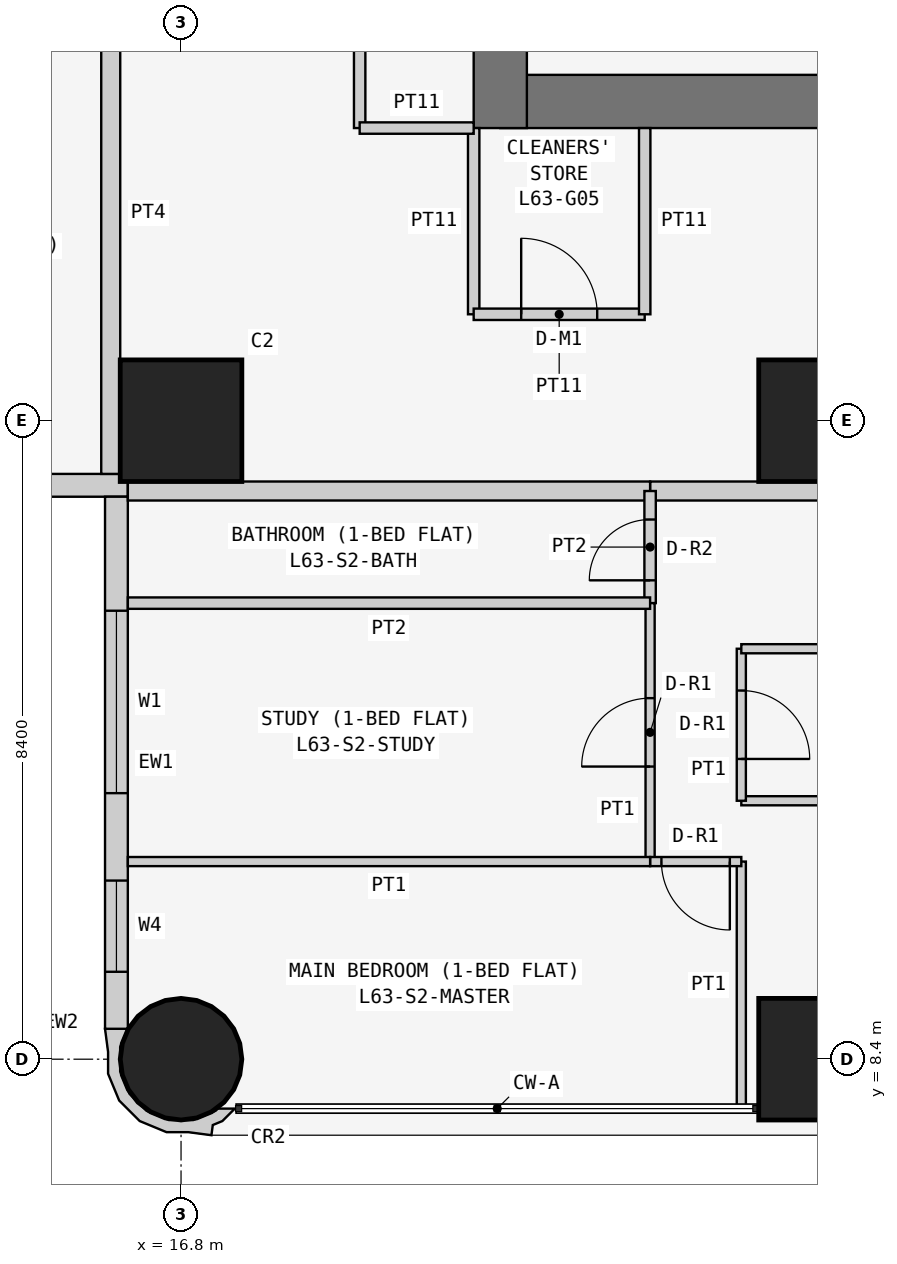
"""IFC4 building model, lengths in metres.
Left out: names, types, materials, properties, quantities, classifications, styles, units other than length and angle.
Written with IfcOpenShell. Run it as: python <this file> out.ifc"""

import sys

from ifc_helpers import new_model, si_unit, direction, frame, frame_2d, origin, origin_2d, place, context, subcontext, project, spatial, polyline, rectangle, circle, outline, extrude, element, fill, save


model = new_model("IFC4")
c1 = context("Model", 3, precision=1e-05, world=origin(), true_north=direction((0.0, 1.0)))
c2 = subcontext(c1, "Body", "Model", "MODEL_VIEW")
j1 = project(units=[si_unit("LENGTHUNIT", "METRE"), si_unit("PLANEANGLEUNIT", "RADIAN")], contexts=[c1])
p1 = place(None, origin())
s1 = spatial("IfcSite", under=j1, at=p1, CompositionType="ELEMENT")
p2 = place(p1, origin())
s2 = spatial("IfcBuilding", under=s1, at=p2, CompositionType="ELEMENT")
p3 = place(p2, frame((0.0, 0.0, 240.9)))
s3 = spatial("IfcBuildingStorey", under=s2, at=p3, CompositionType="ELEMENT", Elevation=240.9)
p4 = place(p3, frame((16.8, 8.4, 0.0), z_axis=(0.0, 0.0, 1.0), x_axis=(1.0, 0.0, 0.0)))
e1 = element("IfcColumn", 1, at=p4, inside=s3, PredefinedType="COLUMN", context=c2, shape_type="SweptSolid", body=[
    extrude(circle(Radius=0.8, at=origin_2d()), origin(), (0.0, 0.0, 1.0), 3.6),
])
for number, where, z_axis, x_axis in (
    (2, (16.8, 16.8, 0.0), (0.0, 0.0, 1.0), (1.0, 0.0, 0.0)),
    (3, (25.2, 8.4, 0.0), (0.0, 0.0, 1.0), (1.0, 0.0, 0.0)),
    (4, (25.2, 16.8, 0.0), (0.0, 0.0, 1.0), (1.0, 0.0, 0.0)),
):
    element("IfcColumn", number, at=place(p3, frame(where, z_axis=z_axis, x_axis=x_axis)), inside=s3, PredefinedType="COLUMN", context=c2, shape_type="SweptSolid", body=[
        extrude(rectangle(XDim=1.6, YDim=1.6, at=origin_2d()), origin(), (0.0, 0.0, 1.0), 3.6),
    ])
p5 = place(p3, frame((21.0, 21.0, 0.0), z_axis=(0.0, 0.0, 1.0), x_axis=(1.0, 0.0, 0.0)))
e5 = element("IfcWall", 5, at=p5, inside=s3, PredefinedType="SHEAR", context=c2, shape_type="SweptSolid", body=[
    extrude(rectangle(XDim=17.15, YDim=0.7, at=frame_2d((8.575, 0.0))), origin(), (0.0, 0.0, 1.0), 3.6),
])
p6 = place(p3, frame((21.0, 37.8, 0.0), z_axis=(0.0, 0.0, 1.0), x_axis=(0.0, -1.0, 0.0)))
e6 = element("IfcWall", 6, at=p6, inside=s3, PredefinedType="SHEAR", context=c2, shape_type="SweptSolid", body=[
    extrude(rectangle(XDim=17.15, YDim=0.7, at=frame_2d((8.575, 0.0))), origin(), (0.0, 0.0, 1.0), 3.6),
])
p7 = place(p6, frame((5.4, 0.0, 0.0)))
e7 = element("IfcOpeningElement", 7, at=p7, cuts=e6, PredefinedType="OPENING", context=c2, shape_type="SweptSolid", body=[
    extrude(rectangle(XDim=1.2, YDim=2.1, at=frame_2d((0.6, 1.05))), frame((0.0, 0.36, 0.0), z_axis=(0.0, -1.0, 0.0), x_axis=(1.0, 0.0, 0.0)), (0.0, 0.0, 1.0), 0.72),
])
p8 = place(p3, frame((0.4, 15.95, 0.0), z_axis=(0.0, 0.0, 1.0), x_axis=(1.0, 0.0, 0.0)))
e8 = element("IfcWall", 8, at=p8, inside=s3, PredefinedType="SOLIDWALL", context=c2, shape_type="SweptSolid", body=[
    extrude(rectangle(XDim=15.7, YDim=0.3, at=frame_2d((7.85, 0.0))), origin(), (0.0, 0.0, 1.0), 3.45),
])
p9 = place(p8, frame((12.4, 0.0, 0.9)))
e9 = element("IfcOpeningElement", 9, at=p9, cuts=e8, PredefinedType="OPENING", context=c2, shape_type="SweptSolid", body=[
    extrude(rectangle(XDim=1.8, YDim=1.5, at=frame_2d((0.9, 0.75))), frame((0.0, 0.16, 0.0), z_axis=(0.0, -1.0, 0.0), x_axis=(1.0, 0.0, 0.0)), (0.0, 0.0, 1.0), 0.32),
])
p10 = place(p8, frame((9.55, 0.0, 1.5)))
e10 = element("IfcOpeningElement", 10, at=p10, cuts=e8, PredefinedType="OPENING", context=c2, shape_type="SweptSolid", body=[
    extrude(rectangle(XDim=0.9, YDim=0.7, at=frame_2d((0.45, 0.35))), frame((0.0, 0.16, 0.0), z_axis=(0.0, -1.0, 0.0), x_axis=(1.0, 0.0, 0.0)), (0.0, 0.0, 1.0), 0.32),
])
p11 = place(p8, frame((5.1, 0.0, 0.9)))
e11 = element("IfcOpeningElement", 11, at=p11, cuts=e8, PredefinedType="OPENING", context=c2, shape_type="SweptSolid", body=[
    extrude(rectangle(XDim=1.8, YDim=1.5, at=frame_2d((0.9, 0.75))), frame((0.0, 0.16, 0.0), z_axis=(0.0, -1.0, 0.0), x_axis=(1.0, 0.0, 0.0)), (0.0, 0.0, 1.0), 0.32),
])
p12 = place(p8, frame((2.0, 0.0, 0.0)))
e12 = element("IfcOpeningElement", 12, at=p12, cuts=e8, PredefinedType="OPENING", context=c2, shape_type="SweptSolid", body=[
    extrude(rectangle(XDim=0.9, YDim=2.4, at=frame_2d((0.45, 1.2))), frame((0.0, 0.16, 0.0), z_axis=(0.0, -1.0, 0.0), x_axis=(1.0, 0.0, 0.0)), (0.0, 0.0, 1.0), 0.32),
])
p13 = place(p8, frame((0.7, 0.0, 0.9)))
e13 = element("IfcOpeningElement", 13, at=p13, cuts=e8, PredefinedType="OPENING", context=c2, shape_type="SweptSolid", body=[
    extrude(rectangle(XDim=1.2, YDim=1.5, at=frame_2d((0.6, 0.75))), frame((0.0, 0.16, 0.0), z_axis=(0.0, -1.0, 0.0), x_axis=(1.0, 0.0, 0.0)), (0.0, 0.0, 1.0), 0.32),
])
p14 = place(p3, frame((15.95, 15.8, 0.0), z_axis=(0.0, 0.0, 1.0), x_axis=(0.0, -1.0, 0.0)))
e14 = element("IfcWall", 14, at=p14, inside=s3, PredefinedType="SOLIDWALL", context=c2, shape_type="SweptSolid", body=[
    extrude(rectangle(XDim=7.0, YDim=0.3, at=frame_2d((3.5, 0.0))), origin(), (0.0, 0.0, 1.0), 3.45),
])
p15 = place(p14, frame((1.5, 0.0, 0.9)))
e15 = element("IfcOpeningElement", 15, at=p15, cuts=e14, PredefinedType="OPENING", context=c2, shape_type="SweptSolid", body=[
    extrude(rectangle(XDim=2.4, YDim=1.5, at=frame_2d((1.2, 0.75))), frame((0.0, 0.16, 0.0), z_axis=(0.0, -1.0, 0.0), x_axis=(1.0, 0.0, 0.0)), (0.0, 0.0, 1.0), 0.32),
])
p16 = place(p14, frame((5.05, 0.0, 0.9)))
e16 = element("IfcOpeningElement", 16, at=p16, cuts=e14, PredefinedType="OPENING", context=c2, shape_type="SweptSolid", body=[
    extrude(rectangle(XDim=1.2, YDim=1.5, at=frame_2d((0.6, 0.75))), frame((0.0, 0.16, 0.0), z_axis=(0.0, -1.0, 0.0), x_axis=(1.0, 0.0, 0.0)), (0.0, 0.0, 1.0), 0.32),
])
p17 = place(p3, frame((15.983, 8.727, 0.0), z_axis=(0.0, 0.0, 1.0), x_axis=(-0.343276641956, -0.93923434088, 0.0)))
e17 = element("IfcWall", 17, at=p17, inside=s3, PredefinedType="SOLIDWALL", context=c2, shape_type="SweptSolid", body=[
    extrude(outline(polyline([(0.829, 1.599), (0.697, 1.569), (0.604, 1.67), (0.394, 1.767), (0.471, 1.556), (0.509, 1.539), (0.724, 1.304), (0.833, 1.005), (0.82, 0.686), (0.686, 0.397), (0.451, 0.182), (0.152, 0.073), (-0.116, 0.084), (-0.127, 0.078), (-0.146, 0.071), (-0.006, -0.197), (0.266, -0.055), (0.535, 0.044), (0.817, 0.302), (0.978, 0.648), (0.994, 1.03), (0.895, 1.3), (0.829, 1.599)])), origin(), (0.0, 0.0, 1.0), 3.45),
])
p18 = place(p3, frame((20.65, 20.65, 0.0), z_axis=(0.0, 0.0, 1.0), x_axis=(0.0, -1.0, 0.0)))
e18 = element("IfcWall", 18, at=p18, inside=s3, PredefinedType="PARTITIONING", context=c2, shape_type="SweptSolid", body=[
    extrude(rectangle(XDim=2.45, YDim=0.15, at=frame_2d((1.225, 0.0))), origin(), (0.0, 0.0, 1.0), 3.45),
])
p19 = place(p3, frame((20.65, 18.2, 0.0), z_axis=(0.0, 0.0, 1.0), x_axis=(1.0, 0.0, 0.0)))
e19 = element("IfcWall", 19, at=p19, inside=s3, PredefinedType="PARTITIONING", context=c2, shape_type="SweptSolid", body=[
    extrude(rectangle(XDim=2.25, YDim=0.15, at=frame_2d((1.125, 0.0))), origin(), (0.0, 0.0, 1.0), 3.45),
])
p20 = place(p19, frame((0.625, 0.0, 0.0)))
e20 = element("IfcOpeningElement", 20, at=p20, cuts=e19, PredefinedType="OPENING", context=c2, shape_type="SweptSolid", body=[
    extrude(rectangle(XDim=1.0, YDim=2.1, at=frame_2d((0.5, 1.05))), frame((0.0, 0.085, 0.0), z_axis=(0.0, -1.0, 0.0), x_axis=(1.0, 0.0, 0.0)), (0.0, 0.0, 1.0), 0.17),
])
p21 = place(p3, frame((22.9, 18.2, 0.0), z_axis=(0.0, 0.0, 1.0), x_axis=(0.0, 1.0, 0.0)))
e21 = element("IfcWall", 21, at=p21, inside=s3, PredefinedType="PARTITIONING", context=c2, shape_type="SweptSolid", body=[
    extrude(rectangle(XDim=2.45, YDim=0.15, at=frame_2d((1.225, 0.0))), origin(), (0.0, 0.0, 1.0), 3.45),
])
p22 = place(p3, frame((19.15, 30.6, 0.0), z_axis=(0.0, 0.0, 1.0), x_axis=(0.0, -1.0, 0.0)))
e22 = element("IfcWall", 22, at=p22, inside=s3, PredefinedType="PARTITIONING", context=c2, shape_type="SweptSolid", body=[
    extrude(rectangle(XDim=9.95, YDim=0.15, at=frame_2d((4.975, 0.0))), origin(), (0.0, 0.0, 1.0), 3.45),
])
p23 = place(p22, frame((1.65, 0.0, 0.0)))
e23 = element("IfcOpeningElement", 23, at=p23, cuts=e22, PredefinedType="OPENING", context=c2, shape_type="SweptSolid", body=[
    extrude(rectangle(XDim=1.0, YDim=2.1, at=frame_2d((0.5, 1.05))), frame((0.0, 0.085, 0.0), z_axis=(0.0, -1.0, 0.0), x_axis=(1.0, 0.0, 0.0)), (0.0, 0.0, 1.0), 0.17),
])
p24 = place(p3, frame((19.15, 20.65, 0.0), z_axis=(0.0, 0.0, 1.0), x_axis=(1.0, 0.0, 0.0)))
e24 = element("IfcWall", 24, at=p24, inside=s3, PredefinedType="PARTITIONING", context=c2, shape_type="SweptSolid", body=[
    extrude(rectangle(XDim=1.5, YDim=0.15, at=frame_2d((0.75, 0.0))), origin(), (0.0, 0.0, 1.0), 3.45),
])
p25 = place(p3, frame((29.4, 15.875, 0.0), z_axis=(0.0, 0.0, 1.0), x_axis=(-1.0, 0.0, 0.0)))
e25 = element("IfcWall", 25, at=p25, inside=s3, PredefinedType="PARTITIONING", context=c2, shape_type="SweptSolid", body=[
    extrude(rectangle(XDim=6.429, YDim=0.25, at=frame_2d((3.214, 0.0))), origin(), (0.0, 0.0, 1.0), 3.45),
])
p26 = place(p25, frame((0.5, 0.0, 0.0)))
e26 = element("IfcOpeningElement", 26, at=p26, cuts=e25, PredefinedType="OPENING", context=c2, shape_type="SweptSolid", body=[
    extrude(rectangle(XDim=1.0, YDim=2.1, at=frame_2d((0.5, 1.05))), frame((0.0, 0.135, 0.0), z_axis=(0.0, -1.0, 0.0), x_axis=(1.0, 0.0, 0.0)), (0.0, 0.0, 1.0), 0.27),
])
for number, where, z_axis, x_axis in (
    (27, (22.971, 15.875, 0.0), (0.0, 0.0, 1.0), (-1.0, 0.0, 0.0)),
    (28, (15.875, 16.1, 0.0), (0.0, 0.0, 1.0), (0.0, 1.0, 0.0)),
):
    element("IfcWall", number, at=place(p3, frame(where, z_axis=z_axis, x_axis=x_axis)), inside=s3, PredefinedType="PARTITIONING", context=c2, shape_type="SweptSolid", body=[
        extrude(rectangle(XDim=6.871, YDim=0.25, at=frame_2d((3.436, 0.0))), origin(), (0.0, 0.0, 1.0), 3.45),
    ])
p27 = place(p3, frame((29.4, 11.8, 0.0), z_axis=(0.0, 0.0, 1.0), x_axis=(-1.0, 0.0, 0.0)))
e29 = element("IfcWall", 29, at=p27, inside=s3, PredefinedType="PARTITIONING", context=c2, shape_type="SweptSolid", body=[
    extrude(rectangle(XDim=5.229, YDim=0.12, at=frame_2d((2.615, 0.0))), origin(), (0.0, 0.0, 1.0), 3.45),
])
p28 = place(p3, frame((24.171, 11.8, 0.0), z_axis=(0.0, 0.0, 1.0), x_axis=(0.0, 1.0, 0.0)))
e30 = element("IfcWall", 30, at=p28, inside=s3, PredefinedType="PARTITIONING", context=c2, shape_type="SweptSolid", body=[
    extrude(rectangle(XDim=2.0, YDim=0.12, at=frame_2d((1.0, 0.0))), origin(), (0.0, 0.0, 1.0), 3.45),
])
p29 = place(p28, frame((0.55, 0.0, 0.0)))
e31 = element("IfcOpeningElement", 31, at=p29, cuts=e30, PredefinedType="OPENING", context=c2, shape_type="SweptSolid", body=[
    extrude(rectangle(XDim=0.9, YDim=2.1, at=frame_2d((0.45, 1.05))), frame((0.0, 0.07, 0.0), z_axis=(0.0, -1.0, 0.0), x_axis=(1.0, 0.0, 0.0)), (0.0, 0.0, 1.0), 0.14),
])
p30 = place(p3, frame((24.171, 13.8, 0.0), z_axis=(0.0, 0.0, 1.0), x_axis=(1.0, 0.0, 0.0)))
e32 = element("IfcWall", 32, at=p30, inside=s3, PredefinedType="PARTITIONING", context=c2, shape_type="SweptSolid", body=[
    extrude(rectangle(XDim=5.229, YDim=0.12, at=frame_2d((2.615, 0.0))), origin(), (0.0, 0.0, 1.0), 3.45),
])
p31 = place(p3, frame((22.971, 14.4, 0.0), z_axis=(0.0, 0.0, 1.0), x_axis=(0.0, 1.0, 0.0)))
e33 = element("IfcWall", 33, at=p31, inside=s3, PredefinedType="PARTITIONING", context=c2, shape_type="SweptSolid", body=[
    extrude(rectangle(XDim=1.475, YDim=0.15, at=frame_2d((0.738, 0.0))), origin(), (0.0, 0.0, 1.0), 3.45),
])
p32 = place(p31, frame((0.3, 0.0, 0.0)))
e34 = element("IfcOpeningElement", 34, at=p32, cuts=e33, PredefinedType="OPENING", context=c2, shape_type="SweptSolid", body=[
    extrude(rectangle(XDim=0.8, YDim=2.1, at=frame_2d((0.4, 1.05))), frame((0.0, 0.085, 0.0), z_axis=(0.0, -1.0, 0.0), x_axis=(1.0, 0.0, 0.0)), (0.0, 0.0, 1.0), 0.17),
])
p33 = place(p3, frame((22.971, 11.0, 0.0), z_axis=(0.0, 0.0, 1.0), x_axis=(0.0, 1.0, 0.0)))
e35 = element("IfcWall", 35, at=p33, inside=s3, PredefinedType="PARTITIONING", context=c2, shape_type="SweptSolid", body=[
    extrude(rectangle(XDim=3.4, YDim=0.12, at=frame_2d((1.7, 0.0))), origin(), (0.0, 0.0, 1.0), 3.45),
])
p34 = place(p33, frame((1.25, 0.0, 0.0)))
e36 = element("IfcOpeningElement", 36, at=p34, cuts=e35, PredefinedType="OPENING", context=c2, shape_type="SweptSolid", body=[
    extrude(rectangle(XDim=0.9, YDim=2.1, at=frame_2d((0.45, 1.05))), frame((0.0, 0.07, 0.0), z_axis=(0.0, -1.0, 0.0), x_axis=(1.0, 0.0, 0.0)), (0.0, 0.0, 1.0), 0.14),
])
p35 = place(p3, frame((24.171, 7.75, 0.0), z_axis=(0.0, 0.0, 1.0), x_axis=(0.0, 1.0, 0.0)))
e37 = element("IfcWall", 37, at=p35, inside=s3, PredefinedType="PARTITIONING", context=c2, shape_type="SweptSolid", body=[
    extrude(rectangle(XDim=3.25, YDim=0.12, at=frame_2d((1.625, 0.0))), origin(), (0.0, 0.0, 1.0), 3.45),
])
p36 = place(p3, frame((24.171, 11.0, 0.0), z_axis=(0.0, 0.0, 1.0), x_axis=(-1.0, 0.0, 0.0)))
e38 = element("IfcWall", 38, at=p36, inside=s3, PredefinedType="PARTITIONING", context=c2, shape_type="SweptSolid", body=[
    extrude(rectangle(XDim=1.2, YDim=0.12, at=frame_2d((0.6, 0.0))), origin(), (0.0, 0.0, 1.0), 3.45),
])
p37 = place(p36, frame((0.151, 0.0, 0.0)))
e39 = element("IfcOpeningElement", 39, at=p37, cuts=e38, PredefinedType="OPENING", context=c2, shape_type="SweptSolid", body=[
    extrude(rectangle(XDim=0.9, YDim=2.1, at=frame_2d((0.45, 1.05))), frame((0.0, 0.07, 0.0), z_axis=(0.0, -1.0, 0.0), x_axis=(1.0, 0.0, 0.0)), (0.0, 0.0, 1.0), 0.14),
])
p38 = place(p3, frame((22.971, 14.4, 0.0), z_axis=(0.0, 0.0, 1.0), x_axis=(-1.0, 0.0, 0.0)))
e40 = element("IfcWall", 40, at=p38, inside=s3, PredefinedType="PARTITIONING", context=c2, shape_type="SweptSolid", body=[
    extrude(rectangle(XDim=6.871, YDim=0.15, at=frame_2d((3.436, 0.0))), origin(), (0.0, 0.0, 1.0), 3.45),
])
p39 = place(p3, frame((22.971, 11.0, 0.0), z_axis=(0.0, 0.0, 1.0), x_axis=(-1.0, 0.0, 0.0)))
e41 = element("IfcWall", 41, at=p39, inside=s3, PredefinedType="PARTITIONING", context=c2, shape_type="SweptSolid", body=[
    extrude(rectangle(XDim=6.871, YDim=0.12, at=frame_2d((3.436, 0.0))), origin(), (0.0, 0.0, 1.0), 3.45),
])
p40 = place(p15, origin())
e42 = element("IfcWindow", 42, at=p40, inside=s3, PartitioningType="SINGLE_PANEL", PredefinedType="WINDOW", context=c2, shape_type="SweptSolid", body=[
    extrude(rectangle(XDim=2.4, YDim=1.5, at=frame_2d((1.2, 0.75))), frame((0.0, 0.03, 0.0), z_axis=(0.0, -1.0, 0.0), x_axis=(1.0, 0.0, 0.0)), (0.0, 0.0, 1.0), 0.06),
])
fill(e15, e42)
p41 = place(p16, origin())
e43 = element("IfcWindow", 43, at=p41, inside=s3, PartitioningType="SINGLE_PANEL", PredefinedType="WINDOW", context=c2, shape_type="SweptSolid", body=[
    extrude(rectangle(XDim=1.2, YDim=1.5, at=frame_2d((0.6, 0.75))), frame((0.0, 0.03, 0.0), z_axis=(0.0, -1.0, 0.0), x_axis=(1.0, 0.0, 0.0)), (0.0, 0.0, 1.0), 0.06),
])
fill(e16, e43)
p42 = place(p20, origin())
e44 = element("IfcDoor", 44, at=p42, inside=s3, OperationType="SINGLE_SWING_LEFT", PredefinedType="DOOR", context=c2, shape_type="SweptSolid", body=[
    extrude(rectangle(XDim=1.0, YDim=2.1, at=frame_2d((0.5, 1.05))), frame((0.0, 0.025, 0.0), z_axis=(0.0, -1.0, 0.0), x_axis=(1.0, 0.0, 0.0)), (0.0, 0.0, 1.0), 0.05),
])
fill(e20, e44)
p43 = place(p29, frame((0.9, 0.0, 0.0), z_axis=(0.0, 0.0, 1.0), x_axis=(-1.0, 0.0, 0.0)))
e45 = element("IfcDoor", 45, at=p43, inside=s3, OperationType="SINGLE_SWING_RIGHT", PredefinedType="DOOR", context=c2, shape_type="SweptSolid", body=[
    extrude(rectangle(XDim=0.9, YDim=2.1, at=frame_2d((0.45, 1.05))), frame((0.0, 0.025, 0.0), z_axis=(0.0, -1.0, 0.0), x_axis=(1.0, 0.0, 0.0)), (0.0, 0.0, 1.0), 0.05),
])
fill(e31, e45)
p44 = place(p32, origin())
e46 = element("IfcDoor", 46, at=p44, inside=s3, OperationType="SINGLE_SWING_LEFT", PredefinedType="DOOR", context=c2, shape_type="SweptSolid", body=[
    extrude(rectangle(XDim=0.8, YDim=2.1, at=frame_2d((0.4, 1.05))), frame((0.0, 0.025, 0.0), z_axis=(0.0, -1.0, 0.0), x_axis=(1.0, 0.0, 0.0)), (0.0, 0.0, 1.0), 0.05),
])
fill(e34, e46)
p45 = place(p34, origin())
e47 = element("IfcDoor", 47, at=p45, inside=s3, OperationType="SINGLE_SWING_LEFT", PredefinedType="DOOR", context=c2, shape_type="SweptSolid", body=[
    extrude(rectangle(XDim=0.9, YDim=2.1, at=frame_2d((0.45, 1.05))), frame((0.0, 0.025, 0.0), z_axis=(0.0, -1.0, 0.0), x_axis=(1.0, 0.0, 0.0)), (0.0, 0.0, 1.0), 0.05),
])
fill(e36, e47)
p46 = place(p37, origin())
e48 = element("IfcDoor", 48, at=p46, inside=s3, OperationType="SINGLE_SWING_LEFT", PredefinedType="DOOR", context=c2, shape_type="SweptSolid", body=[
    extrude(rectangle(XDim=0.9, YDim=2.1, at=frame_2d((0.45, 1.05))), frame((0.0, 0.025, 0.0), z_axis=(0.0, -1.0, 0.0), x_axis=(1.0, 0.0, 0.0)), (0.0, 0.0, 1.0), 0.05),
])
fill(e39, e48)
save(model, sys.argv[1])
